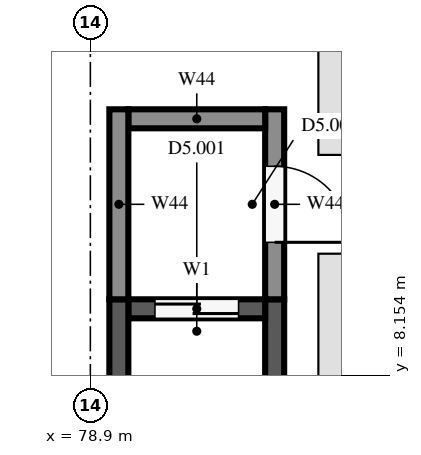
"""IFC4 building model, lengths in metres.
Left out: names, types, materials, properties, quantities, classifications, styles, units other than length and angle.
Written with IfcOpenShell. Run it as: python <this file> out.ifc"""

import sys

from ifc_helpers import new_model, si_unit, direction, frame, frame_2d, origin, place, context, subcontext, project, spatial, rectangle, extrude, element, fill, save


model = new_model("IFC4")
c1 = context("Model", 3, precision=1e-05, world=origin(), true_north=direction((0.0, 1.0)))
c2 = subcontext(c1, "Body", "Model", "MODEL_VIEW")
j1 = project(units=[si_unit("LENGTHUNIT", "METRE"), si_unit("PLANEANGLEUNIT", "RADIAN")], contexts=[c1])
p1 = place(None, origin())
s1 = spatial("IfcSite", under=j1, at=p1, CompositionType="ELEMENT")
p2 = place(p1, origin())
s2 = spatial("IfcBuilding", under=s1, at=p2, CompositionType="ELEMENT")
p3 = place(p2, frame((0.0, 0.0, 18.9)))
s3 = spatial("IfcBuildingStorey", under=s2, at=p3, CompositionType="ELEMENT", Elevation=18.9)
for number, where, z_axis, x_axis in (
    (1, (79.275, 6.25, 0.0), (0.0, 0.0, 1.0), (0.0, 1.0, 0.0)),
    (2, (81.325, 6.25, 0.0), (0.0, 0.0, 1.0), (0.0, 1.0, 0.0)),
):
    element("IfcWall", number, at=place(p3, frame(where, z_axis=z_axis, x_axis=x_axis)), inside=s3, PredefinedType="SHEAR", context=c2, shape_type="SweptSolid", body=[
        extrude(rectangle(XDim=2.9, YDim=0.25, at=frame_2d((1.45, 0.0))), origin(), (0.0, 0.0, 1.0), 4.2),
    ])
p4 = place(p3, frame((79.4, 9.025, 0.0), z_axis=(0.0, 0.0, 1.0), x_axis=(1.0, 0.0, 0.0)))
e3 = element("IfcWall", 3, at=p4, inside=s3, PredefinedType="SHEAR", context=c2, shape_type="SweptSolid", body=[
    extrude(rectangle(XDim=1.8, YDim=0.25, at=frame_2d((0.9, 0.0))), origin(), (0.0, 0.0, 1.0), 4.2),
])
p5 = place(p4, frame((0.35, 0.0, 0.0)))
e4 = element("IfcOpeningElement", 4, at=p5, cuts=e3, PredefinedType="OPENING", context=c2, shape_type="SweptSolid", body=[
    extrude(rectangle(XDim=1.1, YDim=2.1, at=frame_2d((0.55, 1.05))), frame((0.0, 0.135, 0.0), z_axis=(0.0, -1.0, 0.0), x_axis=(1.0, 0.0, 0.0)), (0.0, 0.0, 1.0), 0.27),
])
p6 = place(p3, frame((79.275, 9.15, 0.0), z_axis=(0.0, 0.0, 1.0), x_axis=(0.0, 1.0, 0.0)))
e5 = element("IfcWall", 5, at=p6, inside=s3, PredefinedType="SOLIDWALL", context=c2, shape_type="SweptSolid", body=[
    extrude(rectangle(XDim=2.5, YDim=0.25, at=frame_2d((1.25, 0.0))), origin(), (0.0, 0.0, 1.0), 4.2),
])
p7 = place(p3, frame((81.325, 11.65, 0.0), z_axis=(0.0, 0.0, 1.0), x_axis=(0.0, -1.0, 0.0)))
e6 = element("IfcWall", 6, at=p7, inside=s3, PredefinedType="SOLIDWALL", context=c2, shape_type="SweptSolid", body=[
    extrude(rectangle(XDim=2.5, YDim=0.25, at=frame_2d((1.25, 0.0))), origin(), (0.0, 0.0, 1.0), 4.2),
])
p8 = place(p7, frame((0.75, 0.0, 0.0)))
e7 = element("IfcOpeningElement", 7, at=p8, cuts=e6, PredefinedType="OPENING", context=c2, shape_type="SweptSolid", body=[
    extrude(rectangle(XDim=1.0, YDim=2.1, at=frame_2d((0.5, 1.05))), frame((0.0, 0.135, 0.0), z_axis=(0.0, -1.0, 0.0), x_axis=(1.0, 0.0, 0.0)), (0.0, 0.0, 1.0), 0.27),
])
p9 = place(p3, frame((79.4, 11.525, 0.0), z_axis=(0.0, 0.0, 1.0), x_axis=(1.0, 0.0, 0.0)))
e8 = element("IfcWall", 8, at=p9, inside=s3, PredefinedType="SOLIDWALL", context=c2, shape_type="SweptSolid", body=[
    extrude(rectangle(XDim=1.8, YDim=0.25, at=frame_2d((0.9, 0.0))), origin(), (0.0, 0.0, 1.0), 4.2),
])
p10 = place(p8, origin())
e9 = element("IfcDoor", 9, at=p10, inside=s3, OperationType="SINGLE_SWING_RIGHT", PredefinedType="DOOR", context=c2, shape_type="SweptSolid", body=[
    extrude(rectangle(XDim=1.0, YDim=2.1, at=frame_2d((0.5, 1.05))), frame((0.0, 0.025, 0.0), z_axis=(0.0, -1.0, 0.0), x_axis=(1.0, 0.0, 0.0)), (0.0, 0.0, 1.0), 0.05),
])
fill(e7, e9)
p11 = place(p5, origin())
e10 = element("IfcDoor", 10, at=p11, inside=s3, OperationType="SLIDING_TO_LEFT", PredefinedType="DOOR", context=c2, shape_type="SweptSolid", body=[
    extrude(rectangle(XDim=1.1, YDim=2.1, at=frame_2d((0.55, 1.05))), frame((0.0, 0.025, 0.0), z_axis=(0.0, -1.0, 0.0), x_axis=(1.0, 0.0, 0.0)), (0.0, 0.0, 1.0), 0.05),
])
fill(e4, e10)
save(model, sys.argv[1])
